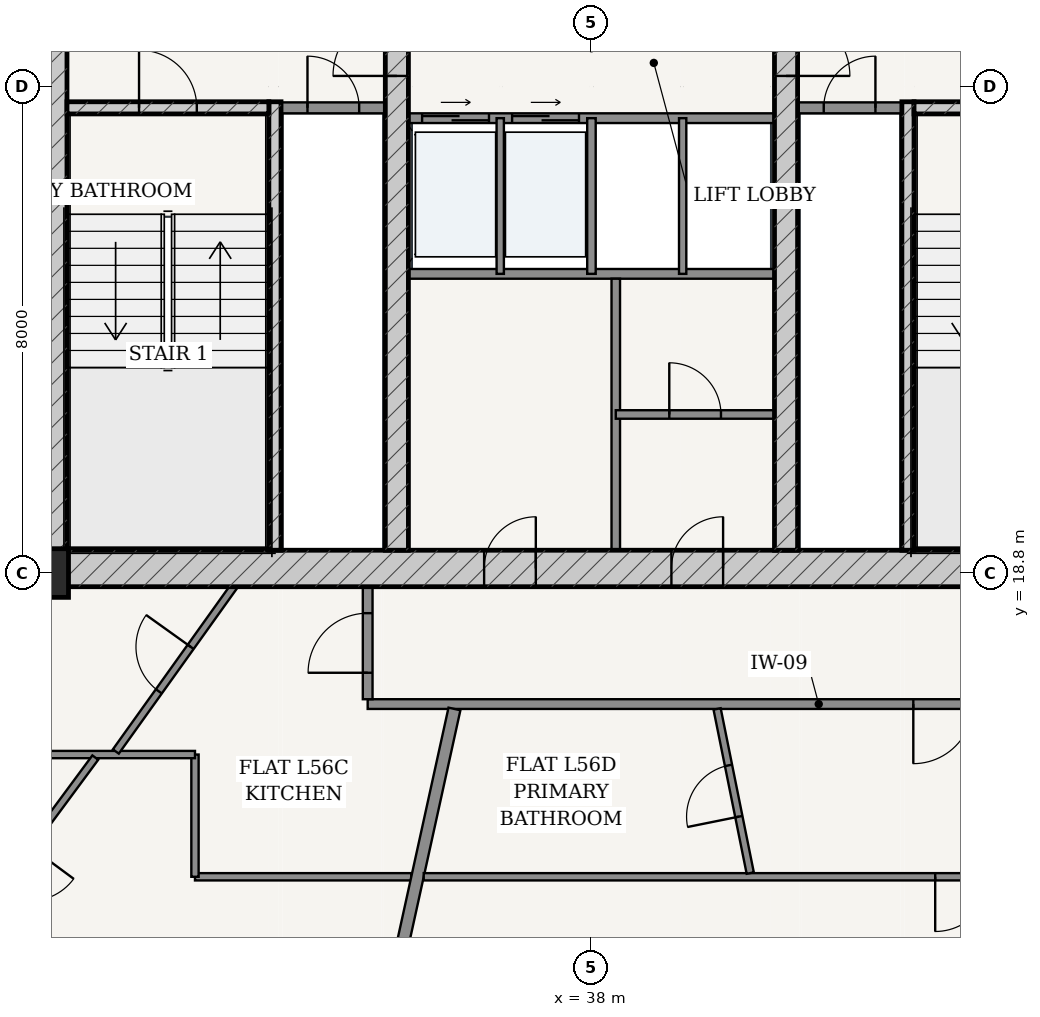
"""IFC4 building model, lengths in metres.
Left out: names, types, materials, properties, quantities, classifications, styles, units other than length and angle.
Written with IfcOpenShell. Run it as: python <this file> out.ifc"""

import sys

from ifc_helpers import new_model, si_unit, direction, frame, frame_2d, origin, origin_2d, place, context, subcontext, project, spatial, rectangle, extrude, source, transform, mapped, element, fill, save


model = new_model("IFC4")
c1 = context("Model", 3, precision=1e-05, world=origin(), true_north=direction((-0.2419218956, 0.970295726276)))
c2 = subcontext(c1, "Body", "Model", "MODEL_VIEW")
j1 = project(units=[si_unit("LENGTHUNIT", "METRE"), si_unit("PLANEANGLEUNIT", "RADIAN")], contexts=[c1])
p1 = place(None, origin())
s1 = spatial("IfcSite", under=j1, at=p1, CompositionType="ELEMENT")
p2 = place(p1, origin())
s2 = spatial("IfcBuilding", under=s1, at=p2, CompositionType="ELEMENT")
p3 = place(p2, frame((0.0, 0.0, 213.4)))
s3 = spatial("IfcBuildingStorey", under=s2, at=p3, CompositionType="ELEMENT", Elevation=213.4)
p4 = place(p3, frame((29.0, 18.8, 0.0), z_axis=(0.0, 0.0, 1.0), x_axis=(1.0, 0.0, 0.0)))
e1 = element("IfcColumn", 1, at=p4, inside=s3, PredefinedType="COLUMN", context=c2, shape_type="SweptSolid", body=[
    extrude(rectangle(XDim=0.8, YDim=0.8, at=origin_2d()), origin(), (0.0, 0.0, 1.0), 3.7),
])
p5 = place(p3, frame((28.775, 18.875, 0.0), z_axis=(0.0, 0.0, 1.0), x_axis=(1.0, 0.0, 0.0)))
e2 = element("IfcWall", 2, at=p5, inside=s3, PredefinedType="SHEAR", context=c2, shape_type="SweptSolid", body=[
    extrude(rectangle(XDim=18.45, YDim=0.6, at=frame_2d((9.225, 0.0))), origin(), (0.0, 0.0, 1.0), 3.435),
])
p6 = place(p5, frame((7.46, 0.0, 0.0)))
e3 = element("IfcOpeningElement", 3, at=p6, cuts=e2, PredefinedType="OPENING", context=c2, shape_type="SweptSolid", body=[
    extrude(rectangle(XDim=0.85, YDim=2.1, at=frame_2d((0.425, 1.05))), frame((0.0, 0.31, 0.0), z_axis=(0.0, -1.0, 0.0), x_axis=(1.0, 0.0, 0.0)), (0.0, 0.0, 1.0), 0.62),
])
p7 = place(p5, frame((10.54, 0.0, 0.0)))
e4 = element("IfcOpeningElement", 4, at=p7, cuts=e2, PredefinedType="OPENING", context=c2, shape_type="SweptSolid", body=[
    extrude(rectangle(XDim=0.85, YDim=2.1, at=frame_2d((0.425, 1.05))), frame((0.0, 0.31, 0.0), z_axis=(0.0, -1.0, 0.0), x_axis=(1.0, 0.0, 0.0)), (0.0, 0.0, 1.0), 0.62),
])
p8 = place(p3, frame((29.075, 19.175, 0.0), z_axis=(0.0, 0.0, 1.0), x_axis=(0.0, 1.0, 0.0)))
e5 = element("IfcWall", 5, at=p8, inside=s3, PredefinedType="SHEAR", context=c2, shape_type="SweptSolid", body=[
    extrude(rectangle(XDim=15.25, YDim=0.6, at=frame_2d((7.625, 0.0))), origin(), (0.0, 0.0, 1.0), 3.435),
])
p9 = place(p8, frame((9.875, 0.0, 0.0)))
e6 = element("IfcOpeningElement", 6, at=p9, cuts=e5, PredefinedType="OPENING", context=c2, shape_type="SweptSolid", body=[
    extrude(rectangle(XDim=1.5, YDim=2.2, at=frame_2d((0.75, 1.1))), frame((0.0, 0.31, 0.0), z_axis=(0.0, -1.0, 0.0), x_axis=(1.0, 0.0, 0.0)), (0.0, 0.0, 1.0), 0.62),
])
p10 = place(p3, frame((32.795, 19.175, 0.0), z_axis=(0.0, 0.0, 1.0), x_axis=(0.0, 1.0, 0.0)))
e7 = element("IfcWall", 7, at=p10, inside=s3, PredefinedType="SOLIDWALL", context=c2, shape_type="SweptSolid", body=[
    extrude(rectangle(XDim=7.375, YDim=0.2, at=frame_2d((3.688, 0.0))), origin(), (0.0, 0.0, 1.0), 3.435),
])
p11 = place(p3, frame((29.375, 26.45, 0.0), z_axis=(0.0, 0.0, 1.0), x_axis=(1.0, 0.0, 0.0)))
e8 = element("IfcWall", 8, at=p11, inside=s3, PredefinedType="SOLIDWALL", context=c2, shape_type="SweptSolid", body=[
    extrude(rectangle(XDim=3.32, YDim=0.2, at=frame_2d((1.66, 0.0))), origin(), (0.0, 0.0, 1.0), 3.435),
])
p12 = place(p11, frame((1.185, 0.0, 0.0)))
e9 = element("IfcOpeningElement", 9, at=p12, cuts=e8, PredefinedType="OPENING", context=c2, shape_type="SweptSolid", body=[
    extrude(rectangle(XDim=0.95, YDim=2.15, at=frame_2d((0.475, 1.075))), frame((0.0, 0.11, 0.0), z_axis=(0.0, -1.0, 0.0), x_axis=(1.0, 0.0, 0.0)), (0.0, 0.0, 1.0), 0.22),
])
p13 = place(p3, frame((43.205, 19.175, 0.0), z_axis=(0.0, 0.0, 1.0), x_axis=(0.0, 1.0, 0.0)))
e10 = element("IfcWall", 10, at=p13, inside=s3, PredefinedType="SOLIDWALL", context=c2, shape_type="SweptSolid", body=[
    extrude(rectangle(XDim=7.375, YDim=0.2, at=frame_2d((3.688, 0.0))), origin(), (0.0, 0.0, 1.0), 3.435),
])
p14 = place(p3, frame((43.305, 26.45, 0.0), z_axis=(0.0, 0.0, 1.0), x_axis=(1.0, 0.0, 0.0)))
e11 = element("IfcWall", 11, at=p14, inside=s3, PredefinedType="SOLIDWALL", context=c2, shape_type="SweptSolid", body=[
    extrude(rectangle(XDim=3.32, YDim=0.2, at=frame_2d((1.66, 0.0))), origin(), (0.0, 0.0, 1.0), 3.435),
])
p15 = place(p14, frame((1.185, 0.0, 0.0)))
e12 = element("IfcOpeningElement", 12, at=p15, cuts=e11, PredefinedType="OPENING", context=c2, shape_type="SweptSolid", body=[
    extrude(rectangle(XDim=0.95, YDim=2.15, at=frame_2d((0.475, 1.075))), frame((0.0, 0.11, 0.0), z_axis=(0.0, -1.0, 0.0), x_axis=(1.0, 0.0, 0.0)), (0.0, 0.0, 1.0), 0.22),
])
p16 = place(p3, frame((34.8, 19.175, 0.0), z_axis=(0.0, 0.0, 1.0), x_axis=(0.0, 1.0, 0.0)))
e13 = element("IfcWall", 13, at=p16, inside=s3, PredefinedType="SHEAR", context=c2, shape_type="SweptSolid", body=[
    extrude(rectangle(XDim=15.25, YDim=0.38, at=frame_2d((7.625, 0.0))), origin(), (0.0, 0.0, 1.0), 3.435),
])
p17 = place(p16, frame((7.8, 0.0, 0.0)))
e14 = element("IfcOpeningElement", 14, at=p17, cuts=e13, PredefinedType="OPENING", context=c2, shape_type="SweptSolid", body=[
    extrude(rectangle(XDim=1.05, YDim=2.15, at=frame_2d((0.525, 1.075))), frame((0.0, 0.2, 0.0), z_axis=(0.0, -1.0, 0.0), x_axis=(1.0, 0.0, 0.0)), (0.0, 0.0, 1.0), 0.4),
])
p18 = place(p3, frame((41.2, 19.175, 0.0), z_axis=(0.0, 0.0, 1.0), x_axis=(0.0, 1.0, 0.0)))
e15 = element("IfcWall", 15, at=p18, inside=s3, PredefinedType="SHEAR", context=c2, shape_type="SweptSolid", body=[
    extrude(rectangle(XDim=15.25, YDim=0.38, at=frame_2d((7.625, 0.0))), origin(), (0.0, 0.0, 1.0), 3.435),
])
p19 = place(p18, frame((7.8, 0.0, 0.0)))
e16 = element("IfcOpeningElement", 16, at=p19, cuts=e15, PredefinedType="OPENING", context=c2, shape_type="SweptSolid", body=[
    extrude(rectangle(XDim=1.05, YDim=2.15, at=frame_2d((0.525, 1.075))), frame((0.0, 0.2, 0.0), z_axis=(0.0, -1.0, 0.0), x_axis=(1.0, 0.0, 0.0)), (0.0, 0.0, 1.0), 0.4),
])
p20 = place(p3, frame((32.9, 26.45, 0.0), z_axis=(0.0, 0.0, 1.0), x_axis=(1.0, 0.0, 0.0)))
e17 = element("IfcWall", 17, at=p20, inside=s3, PredefinedType="PARTITIONING", context=c2, shape_type="SweptSolid", body=[
    extrude(rectangle(XDim=1.71, YDim=0.18, at=frame_2d((0.855, 0.0))), origin(), (0.0, 0.0, 1.0), 3.435),
])
p21 = place(p20, frame((0.43, 0.0, 0.0)))
e18 = element("IfcOpeningElement", 18, at=p21, cuts=e17, PredefinedType="OPENING", context=c2, shape_type="SweptSolid", body=[
    extrude(rectangle(XDim=0.85, YDim=2.1, at=frame_2d((0.425, 1.05))), frame((0.0, 0.1, 0.0), z_axis=(0.0, -1.0, 0.0), x_axis=(1.0, 0.0, 0.0)), (0.0, 0.0, 1.0), 0.2),
])
p22 = place(p3, frame((41.39, 26.45, 0.0), z_axis=(0.0, 0.0, 1.0), x_axis=(1.0, 0.0, 0.0)))
e19 = element("IfcWall", 19, at=p22, inside=s3, PredefinedType="PARTITIONING", context=c2, shape_type="SweptSolid", body=[
    extrude(rectangle(XDim=1.71, YDim=0.18, at=frame_2d((0.855, 0.0))), origin(), (0.0, 0.0, 1.0), 3.435),
])
p23 = place(p22, frame((0.43, 0.0, 0.0)))
e20 = element("IfcOpeningElement", 20, at=p23, cuts=e19, PredefinedType="OPENING", context=c2, shape_type="SweptSolid", body=[
    extrude(rectangle(XDim=0.85, YDim=2.1, at=frame_2d((0.425, 1.05))), frame((0.0, 0.1, 0.0), z_axis=(0.0, -1.0, 0.0), x_axis=(1.0, 0.0, 0.0)), (0.0, 0.0, 1.0), 0.2),
])
p24 = place(p3, frame((34.99, 26.28, 0.0), z_axis=(0.0, 0.0, 1.0), x_axis=(1.0, 0.0, 0.0)))
e21 = element("IfcWall", 21, at=p24, inside=s3, PredefinedType="PARTITIONING", context=c2, shape_type="SweptSolid", body=[
    extrude(rectangle(XDim=6.02, YDim=0.16, at=frame_2d((3.01, 0.0))), origin(), (0.0, 0.0, 1.0), 3.435),
])
p25 = place(p24, frame((0.225, 0.0, 0.0)))
e22 = element("IfcOpeningElement", 22, at=p25, cuts=e21, PredefinedType="OPENING", context=c2, shape_type="SweptSolid", body=[
    extrude(rectangle(XDim=1.1, YDim=2.2, at=frame_2d((0.55, 1.1))), frame((0.0, 0.09, 0.0), z_axis=(0.0, -1.0, 0.0), x_axis=(1.0, 0.0, 0.0)), (0.0, 0.0, 1.0), 0.18),
])
p26 = place(p24, frame((1.705, 0.0, 0.0)))
e23 = element("IfcOpeningElement", 23, at=p26, cuts=e21, PredefinedType="OPENING", context=c2, shape_type="SweptSolid", body=[
    extrude(rectangle(XDim=1.1, YDim=2.2, at=frame_2d((0.55, 1.1))), frame((0.0, 0.09, 0.0), z_axis=(0.0, -1.0, 0.0), x_axis=(1.0, 0.0, 0.0)), (0.0, 0.0, 1.0), 0.18),
])
p27 = place(p3, frame((34.99, 23.72, 0.0), z_axis=(0.0, 0.0, 1.0), x_axis=(1.0, 0.0, 0.0)))
e24 = element("IfcWall", 24, at=p27, inside=s3, PredefinedType="PARTITIONING", context=c2, shape_type="SweptSolid", body=[
    extrude(rectangle(XDim=6.02, YDim=0.16, at=frame_2d((3.01, 0.0))), origin(), (0.0, 0.0, 1.0), 3.435),
])
p28 = place(p3, frame((36.5, 23.72, 0.0), z_axis=(0.0, 0.0, 1.0), x_axis=(0.0, 1.0, 0.0)))
e25 = element("IfcWall", 25, at=p28, inside=s3, PredefinedType="PARTITIONING", context=c2, shape_type="SweptSolid", body=[
    extrude(rectangle(XDim=2.56, YDim=0.12, at=frame_2d((1.28, 0.0))), origin(), (0.0, 0.0, 1.0), 3.435),
])
p29 = place(p3, frame((38.0, 23.72, 0.0), z_axis=(0.0, 0.0, 1.0), x_axis=(0.0, 1.0, 0.0)))
e26 = element("IfcWall", 26, at=p29, inside=s3, PredefinedType="PARTITIONING", context=c2, shape_type="SweptSolid", body=[
    extrude(rectangle(XDim=2.56, YDim=0.14, at=frame_2d((1.28, 0.0))), origin(), (0.0, 0.0, 1.0), 3.435),
])
p30 = place(p3, frame((39.5, 23.72, 0.0), z_axis=(0.0, 0.0, 1.0), x_axis=(0.0, 1.0, 0.0)))
e27 = element("IfcWall", 27, at=p30, inside=s3, PredefinedType="PARTITIONING", context=c2, shape_type="SweptSolid", body=[
    extrude(rectangle(XDim=2.56, YDim=0.12, at=frame_2d((1.28, 0.0))), origin(), (0.0, 0.0, 1.0), 3.435),
])
p31 = place(p3, frame((38.4, 19.175, 0.0), z_axis=(0.0, 0.0, 1.0), x_axis=(0.0, 1.0, 0.0)))
e28 = element("IfcWall", 28, at=p31, inside=s3, PredefinedType="PARTITIONING", context=c2, shape_type="SweptSolid", body=[
    extrude(rectangle(XDim=4.465, YDim=0.14, at=frame_2d((2.232, 0.0))), origin(), (0.0, 0.0, 1.0), 3.435),
])
p32 = place(p3, frame((38.4, 21.407, 0.0), z_axis=(0.0, 0.0, 1.0), x_axis=(1.0, 0.0, 0.0)))
e29 = element("IfcWall", 29, at=p32, inside=s3, PredefinedType="PARTITIONING", context=c2, shape_type="SweptSolid", body=[
    extrude(rectangle(XDim=2.61, YDim=0.14, at=frame_2d((1.305, 0.0))), origin(), (0.0, 0.0, 1.0), 3.435),
])
p33 = place(p32, frame((0.88, 0.0, 0.0)))
e30 = element("IfcOpeningElement", 30, at=p33, cuts=e29, PredefinedType="OPENING", context=c2, shape_type="SweptSolid", body=[
    extrude(rectangle(XDim=0.85, YDim=2.1, at=frame_2d((0.425, 1.05))), frame((0.0, 0.08, 0.0), z_axis=(0.0, -1.0, 0.0), x_axis=(1.0, 0.0, 0.0)), (0.0, 0.0, 1.0), 0.16),
])
p34 = place(p3, frame((34.32, 16.645, 0.0), z_axis=(0.0, 0.0, 1.0), x_axis=(1.0, 0.0, 0.0)))
e31 = element("IfcWall", 31, at=p34, inside=s3, PredefinedType="PARTITIONING", context=c2, shape_type="SweptSolid", body=[
    extrude(rectangle(XDim=14.835, YDim=0.16, at=frame_2d((7.417, 0.0))), origin(), (0.0, 0.0, 1.0), 2.951),
])
p35 = place(p34, frame((8.973, 0.0, 0.0)))
e32 = element("IfcOpeningElement", 32, at=p35, cuts=e31, PredefinedType="OPENING", context=c2, shape_type="SweptSolid", body=[
    extrude(rectangle(XDim=0.98, YDim=2.2, at=frame_2d((0.49, 1.1))), frame((0.0, 0.09, 0.0), z_axis=(0.0, -1.0, 0.0), x_axis=(1.0, 0.0, 0.0)), (0.0, 0.0, 1.0), 0.18),
])
p36 = place(p3, frame((34.32, 16.725, 0.0), z_axis=(0.0, 0.0, 1.0), x_axis=(0.0, 1.0, 0.0)))
e33 = element("IfcWall", 33, at=p36, inside=s3, PredefinedType="PARTITIONING", context=c2, shape_type="SweptSolid", body=[
    extrude(rectangle(XDim=1.85, YDim=0.16, at=frame_2d((0.925, 0.0))), origin(), (0.0, 0.0, 1.0), 3.435),
])
p37 = place(p36, frame((0.435, 0.0, 0.0)))
e34 = element("IfcOpeningElement", 34, at=p37, cuts=e33, PredefinedType="OPENING", context=c2, shape_type="SweptSolid", body=[
    extrude(rectangle(XDim=0.98, YDim=2.2, at=frame_2d((0.49, 1.1))), frame((0.0, 0.09, 0.0), z_axis=(0.0, -1.0, 0.0), x_axis=(1.0, 0.0, 0.0)), (0.0, 0.0, 1.0), 0.18),
])
p38 = place(p3, frame((35.038, 13.805, 0.0), z_axis=(0.0, 0.0, 1.0), x_axis=(-1.0, 0.0, 0.0)))
e35 = element("IfcWall", 35, at=p38, inside=s3, PredefinedType="PARTITIONING", context=c2, shape_type="SweptSolid", body=[
    extrude(rectangle(XDim=3.558, YDim=0.12, at=frame_2d((1.779, 0.0))), origin(), (0.0, 0.0, 1.0), 2.951),
])
p39 = place(p3, frame((31.48, 13.805, 0.0), z_axis=(0.0, 0.0, 1.0), x_axis=(0.0, 1.0, 0.0)))
e36 = element("IfcWall", 36, at=p39, inside=s3, PredefinedType="PARTITIONING", context=c2, shape_type="SweptSolid", body=[
    extrude(rectangle(XDim=2.01, YDim=0.12, at=frame_2d((1.005, 0.0))), origin(), (0.0, 0.0, 1.0), 3.11),
])
p40 = place(p3, frame((31.48, 15.815, 0.0), z_axis=(0.0, 0.0, 1.0), x_axis=(-1.0, 0.0, 0.0)))
e37 = element("IfcWall", 37, at=p40, inside=s3, PredefinedType="PARTITIONING", context=c2, shape_type="SweptSolid", body=[
    extrude(rectangle(XDim=5.465, YDim=0.12, at=frame_2d((2.732, 0.0))), origin(), (0.0, 0.0, 1.0), 2.951),
])
p41 = place(p3, frame((29.841, 15.765, 0.0), z_axis=(0.0, 0.0, 1.0), x_axis=(-0.594535821787, -0.804069124275, 0.0)))
e38 = element("IfcWall", 38, at=p41, inside=s3, PredefinedType="PARTITIONING", context=c2, shape_type="SweptSolid", body=[
    extrude(rectangle(XDim=6.543, YDim=0.12, at=frame_2d((3.272, 0.0))), origin(), (0.0, 0.0, 1.0), 2.951),
])
p42 = place(p41, frame((1.814, 0.0, 0.0)))
e39 = element("IfcOpeningElement", 39, at=p42, cuts=e38, PredefinedType="OPENING", context=c2, shape_type="SweptSolid", body=[
    extrude(rectangle(XDim=0.9, YDim=2.15, at=frame_2d((0.45, 1.075))), frame((0.0, 0.07, 0.0), z_axis=(0.0, -1.0, 0.0), x_axis=(1.0, 0.0, 0.0)), (0.0, 0.0, 1.0), 0.14),
])
p43 = place(p3, frame((32.117, 18.575, 0.0), z_axis=(0.0, 0.0, 1.0), x_axis=(-0.581813438478, -0.813322274874, 0.0)))
e40 = element("IfcWall", 40, at=p43, inside=s3, PredefinedType="PARTITIONING", context=c2, shape_type="SweptSolid", body=[
    extrude(rectangle(XDim=3.331, YDim=0.12, at=frame_2d((1.666, 0.0))), origin(), (0.0, 0.0, 1.0), 3.435),
])
p44 = place(p43, frame((1.216, 0.0, 0.0)))
e41 = element("IfcOpeningElement", 41, at=p44, cuts=e40, PredefinedType="OPENING", context=c2, shape_type="SweptSolid", body=[
    extrude(rectangle(XDim=0.9, YDim=2.15, at=frame_2d((0.45, 1.075))), frame((0.0, 0.07, 0.0), z_axis=(0.0, -1.0, 0.0), x_axis=(1.0, 0.0, 0.0)), (0.0, 0.0, 1.0), 0.14),
])
p45 = place(p3, frame((35.747, 16.565, 0.0), z_axis=(0.0, 0.0, 1.0), x_axis=(-0.214957946814, -0.976623305631, 0.0)))
e42 = element("IfcWall", 42, at=p45, inside=s3, PredefinedType="PARTITIONING", context=c2, shape_type="SweptSolid", body=[
    extrude(rectangle(XDim=9.202, YDim=0.2, at=frame_2d((4.601, 0.0))), origin(), (0.0, 0.0, 1.0), 2.951),
])
p46 = place(p3, frame((51.995, 13.805, 0.0), z_axis=(0.0, 0.0, 1.0), x_axis=(-1.0, 0.0, 0.0)))
e43 = element("IfcWall", 43, at=p46, inside=s3, PredefinedType="PARTITIONING", context=c2, shape_type="SweptSolid", body=[
    extrude(rectangle(XDim=16.753, YDim=0.12, at=frame_2d((8.377, 0.0))), origin(), (0.0, 0.0, 1.0), 2.951),
])
p47 = place(p46, frame((7.442, 0.0, 0.0)))
e44 = element("IfcOpeningElement", 44, at=p47, cuts=e43, PredefinedType="OPENING", context=c2, shape_type="SweptSolid", body=[
    extrude(rectangle(XDim=0.9, YDim=2.15, at=frame_2d((0.45, 1.075))), frame((0.0, 0.07, 0.0), z_axis=(0.0, -1.0, 0.0), x_axis=(1.0, 0.0, 0.0)), (0.0, 0.0, 1.0), 0.14),
])
p48 = place(p3, frame((40.066, 16.565, 0.0), z_axis=(0.0, 0.0, 1.0), x_axis=(0.197974199315, -0.980207231358, 0.0)))
e45 = element("IfcWall", 45, at=p48, inside=s3, PredefinedType="PARTITIONING", context=c2, shape_type="SweptSolid", body=[
    extrude(rectangle(XDim=2.754, YDim=0.12, at=frame_2d((1.377, 0.0))), origin(), (0.0, 0.0, 1.0), 3.11),
])
p49 = place(p48, frame((0.947, 0.0, 0.0)))
e46 = element("IfcOpeningElement", 46, at=p49, cuts=e45, PredefinedType="OPENING", context=c2, shape_type="SweptSolid", body=[
    extrude(rectangle(XDim=0.86, YDim=2.15, at=frame_2d((0.43, 1.075))), frame((0.0, 0.07, 0.0), z_axis=(0.0, -1.0, 0.0), x_axis=(1.0, 0.0, 0.0)), (0.0, 0.0, 1.0), 0.14),
])
m1 = source(origin(), c2, "Body", "SweptSolid", [
    extrude(rectangle(XDim=1.05, YDim=2.15, at=frame_2d((0.525, 1.075))), frame((0.0, 0.025, 0.0), z_axis=(0.0, -1.0, 0.0), x_axis=(1.0, 0.0, 0.0)), (0.0, 0.0, 1.0), 0.05),
])
p50 = place(p17, origin())
e47 = element("IfcDoor", 47, at=p50, inside=s3, OperationType="SINGLE_SWING_LEFT", PredefinedType="DOOR", context=c2, shape_type="MappedRepresentation", body=[
    mapped(m1, transform((0.0, 0.0, 0.0), scale=1.0)),
])
fill(e14, e47)
p51 = place(p19, frame((1.05, 0.0, 0.0), z_axis=(0.0, 0.0, 1.0), x_axis=(-1.0, 0.0, 0.0)))
e48 = element("IfcDoor", 48, at=p51, inside=s3, OperationType="SINGLE_SWING_RIGHT", PredefinedType="DOOR", context=c2, shape_type="MappedRepresentation", body=[
    mapped(m1, transform((0.0, 0.0, 0.0), scale=1.0)),
])
fill(e16, e48)
m2 = source(origin(), c2, "Body", "SweptSolid", [
    extrude(rectangle(XDim=0.95, YDim=2.15, at=frame_2d((0.475, 1.075))), frame((0.0, 0.025, 0.0), z_axis=(0.0, -1.0, 0.0), x_axis=(1.0, 0.0, 0.0)), (0.0, 0.0, 1.0), 0.05),
])
p52 = place(p12, origin())
e49 = element("IfcDoor", 49, at=p52, inside=s3, OperationType="SINGLE_SWING_LEFT", PredefinedType="DOOR", context=c2, shape_type="MappedRepresentation", body=[
    mapped(m2, transform((0.0, 0.0, 0.0), scale=1.0)),
])
fill(e9, e49)
m3 = source(origin(), c2, "Body", "SweptSolid", [
    extrude(rectangle(XDim=0.85, YDim=2.1, at=frame_2d((0.425, 1.05))), frame((0.0, 0.025, 0.0), z_axis=(0.0, -1.0, 0.0), x_axis=(1.0, 0.0, 0.0)), (0.0, 0.0, 1.0), 0.05),
])
p53 = place(p21, origin())
e50 = element("IfcDoor", 50, at=p53, inside=s3, OperationType="SINGLE_SWING_LEFT", PredefinedType="DOOR", context=c2, shape_type="MappedRepresentation", body=[
    mapped(m3, transform((0.0, 0.0, 0.0), scale=1.0)),
])
fill(e18, e50)
p54 = place(p23, origin())
e51 = element("IfcDoor", 51, at=p54, inside=s3, OperationType="SINGLE_SWING_RIGHT", PredefinedType="DOOR", context=c2, shape_type="MappedRepresentation", body=[
    mapped(m3, transform((0.0, 0.0, 0.0), scale=1.0)),
])
fill(e20, e51)
p55 = place(p6, origin())
e52 = element("IfcDoor", 52, at=p55, inside=s3, OperationType="SINGLE_SWING_RIGHT", PredefinedType="DOOR", context=c2, shape_type="MappedRepresentation", body=[
    mapped(m3, transform((0.0, 0.0, 0.0), scale=1.0)),
])
fill(e3, e52)
p56 = place(p7, origin())
e53 = element("IfcDoor", 53, at=p56, inside=s3, OperationType="SINGLE_SWING_RIGHT", PredefinedType="DOOR", context=c2, shape_type="MappedRepresentation", body=[
    mapped(m3, transform((0.0, 0.0, 0.0), scale=1.0)),
])
fill(e4, e53)
p57 = place(p33, origin())
e54 = element("IfcDoor", 54, at=p57, inside=s3, OperationType="SINGLE_SWING_LEFT", PredefinedType="DOOR", context=c2, shape_type="MappedRepresentation", body=[
    mapped(m3, transform((0.0, 0.0, 0.0), scale=1.0)),
])
fill(e30, e54)
m4 = source(origin(), c2, "Body", "SweptSolid", [
    extrude(rectangle(XDim=1.1, YDim=2.2, at=frame_2d((0.55, 1.1))), frame((0.0, 0.025, 0.0), z_axis=(0.0, -1.0, 0.0), x_axis=(1.0, 0.0, 0.0)), (0.0, 0.0, 1.0), 0.05),
])
p58 = place(p25, origin())
e55 = element("IfcDoor", 55, at=p58, inside=s3, OperationType="DOUBLE_DOOR_SLIDING", PredefinedType="DOOR", context=c2, shape_type="MappedRepresentation", body=[
    mapped(m4, transform((0.0, 0.0, 0.0), scale=1.0)),
])
fill(e22, e55)
p59 = place(p26, origin())
e56 = element("IfcDoor", 56, at=p59, inside=s3, OperationType="DOUBLE_DOOR_SLIDING", PredefinedType="DOOR", context=c2, shape_type="MappedRepresentation", body=[
    mapped(m4, transform((0.0, 0.0, 0.0), scale=1.0)),
])
fill(e23, e56)
m5 = source(origin(), c2, "Body", "SweptSolid", [
    extrude(rectangle(XDim=0.98, YDim=2.2, at=frame_2d((0.49, 1.1))), frame((0.0, 0.025, 0.0), z_axis=(0.0, -1.0, 0.0), x_axis=(1.0, 0.0, 0.0)), (0.0, 0.0, 1.0), 0.05),
])
p60 = place(p37, origin())
e57 = element("IfcDoor", 57, at=p60, inside=s3, OperationType="SINGLE_SWING_LEFT", PredefinedType="DOOR", context=c2, shape_type="MappedRepresentation", body=[
    mapped(m5, transform((0.0, 0.0, 0.0), scale=1.0)),
])
fill(e34, e57)
m6 = source(origin(), c2, "Body", "SweptSolid", [
    extrude(rectangle(XDim=0.9, YDim=2.15, at=frame_2d((0.45, 1.075))), frame((0.0, 0.025, 0.0), z_axis=(0.0, -1.0, 0.0), x_axis=(1.0, 0.0, 0.0)), (0.0, 0.0, 1.0), 0.05),
])
p61 = place(p44, frame((0.9, 0.0, 0.0), z_axis=(0.0, 0.0, 1.0), x_axis=(-1.0, 0.0, 0.0)))
e58 = element("IfcDoor", 58, at=p61, inside=s3, OperationType="SINGLE_SWING_RIGHT", PredefinedType="DOOR", context=c2, shape_type="MappedRepresentation", body=[
    mapped(m6, transform((0.0, 0.0, 0.0), scale=1.0)),
])
fill(e41, e58)
p62 = place(p35, frame((0.98, 0.0, 0.0), z_axis=(0.0, 0.0, 1.0), x_axis=(-1.0, 0.0, 0.0)))
e59 = element("IfcDoor", 59, at=p62, inside=s3, OperationType="SINGLE_SWING_RIGHT", PredefinedType="DOOR", context=c2, shape_type="MappedRepresentation", body=[
    mapped(m5, transform((0.0, 0.0, 0.0), scale=1.0)),
])
fill(e32, e59)
m7 = source(origin(), c2, "Body", "SweptSolid", [
    extrude(rectangle(XDim=0.86, YDim=2.15, at=frame_2d((0.43, 1.075))), frame((0.0, 0.025, 0.0), z_axis=(0.0, -1.0, 0.0), x_axis=(1.0, 0.0, 0.0)), (0.0, 0.0, 1.0), 0.05),
])
p63 = place(p49, frame((0.86, 0.0, 0.0), z_axis=(0.0, 0.0, 1.0), x_axis=(-1.0, 0.0, 0.0)))
e60 = element("IfcDoor", 60, at=p63, inside=s3, OperationType="SINGLE_SWING_LEFT", PredefinedType="DOOR", context=c2, shape_type="MappedRepresentation", body=[
    mapped(m7, transform((0.0, 0.0, 0.0), scale=1.0)),
])
fill(e46, e60)
p64 = place(p47, origin())
e61 = element("IfcDoor", 61, at=p64, inside=s3, OperationType="SINGLE_SWING_RIGHT", PredefinedType="DOOR", context=c2, shape_type="MappedRepresentation", body=[
    mapped(m6, transform((0.0, 0.0, 0.0), scale=1.0)),
])
fill(e44, e61)
save(model, sys.argv[1])
